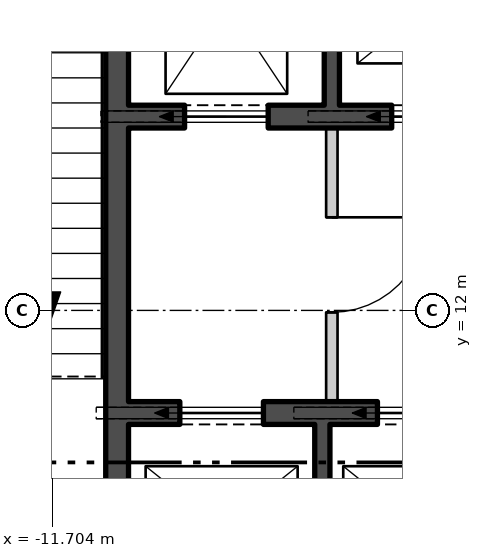
"""IFC4 building model, lengths in metres.
Left out: names, types, materials, properties, quantities, classifications, styles, units other than length and angle.
Written with IfcOpenShell. Run it as: python <this file> out.ifc"""

import sys

from ifc_helpers import new_model, si_unit, direction, frame, frame_2d, origin, place, context, subcontext, project, spatial, polyline, rectangle, outline, extrude, element, fill, save


model = new_model("IFC4")
c1 = context("Model", 3, precision=1e-05, world=origin(), true_north=direction((0.0, 1.0)))
c2 = subcontext(c1, "Body", "Model", "MODEL_VIEW")
j1 = project(units=[si_unit("LENGTHUNIT", "METRE"), si_unit("PLANEANGLEUNIT", "RADIAN")], contexts=[c1])
p1 = place(None, origin())
s1 = spatial("IfcSite", under=j1, at=p1, CompositionType="ELEMENT")
p2 = place(p1, origin())
s2 = spatial("IfcBuilding", under=s1, at=p2, CompositionType="ELEMENT")
p3 = place(p2, frame((0.0, 0.0, 111.3)))
s3 = spatial("IfcBuildingStorey", under=s2, at=p3, CompositionType="ELEMENT", Elevation=111.3)
p4 = place(p3, frame((-27.595, 11.782, -0.18), z_axis=(0.0, 0.0, 1.0), x_axis=(0.500000141277, -0.866025322218, 0.0)))
e1 = element("IfcWall", 1, at=p4, inside=s3, PredefinedType="SOLIDWALL", context=c2, shape_type="SweptSolid", body=[
    extrude(outline(polyline([(-0.13, -0.225), (45.86, -0.225), (45.6, 0.225), (0.13, 0.225), (-0.13, -0.225)])), origin(), (0.0, 0.0, 1.0), 4.28),
])
p5 = place(p4, frame((1.424, 0.0, 1.08)))
e2 = element("IfcOpeningElement", 2, at=p5, cuts=e1, PredefinedType="OPENING", context=c2, shape_type="SweptSolid", body=[
    extrude(rectangle(XDim=2.4, YDim=2.6, at=frame_2d((1.2, 1.3))), frame((0.0, 0.235, 0.0), z_axis=(0.0, -1.0, 0.0), x_axis=(1.0, 0.0, 0.0)), (0.0, 0.0, 1.0), 0.47),
])
p6 = place(p4, frame((5.892, 0.0, 1.08)))
e3 = element("IfcOpeningElement", 3, at=p6, cuts=e1, PredefinedType="OPENING", context=c2, shape_type="SweptSolid", body=[
    extrude(rectangle(XDim=2.4, YDim=2.6, at=frame_2d((1.2, 1.3))), frame((0.0, 0.235, 0.0), z_axis=(0.0, -1.0, 0.0), x_axis=(1.0, 0.0, 0.0)), (0.0, 0.0, 1.0), 0.47),
])
p7 = place(p4, frame((10.399, 0.0, 1.08)))
e4 = element("IfcOpeningElement", 4, at=p7, cuts=e1, PredefinedType="OPENING", context=c2, shape_type="SweptSolid", body=[
    extrude(rectangle(XDim=2.4, YDim=2.6, at=frame_2d((1.2, 1.3))), frame((0.0, 0.235, 0.0), z_axis=(0.0, -1.0, 0.0), x_axis=(1.0, 0.0, 0.0)), (0.0, 0.0, 1.0), 0.47),
])
p8 = place(p4, frame((14.905, 0.0, 1.08)))
e5 = element("IfcOpeningElement", 5, at=p8, cuts=e1, PredefinedType="OPENING", context=c2, shape_type="SweptSolid", body=[
    extrude(rectangle(XDim=2.4, YDim=2.6, at=frame_2d((1.2, 1.3))), frame((0.0, 0.235, 0.0), z_axis=(0.0, -1.0, 0.0), x_axis=(1.0, 0.0, 0.0)), (0.0, 0.0, 1.0), 0.47),
])
p9 = place(p4, frame((19.412, 0.0, 1.08)))
e6 = element("IfcOpeningElement", 6, at=p9, cuts=e1, PredefinedType="OPENING", context=c2, shape_type="SweptSolid", body=[
    extrude(rectangle(XDim=2.4, YDim=2.6, at=frame_2d((1.2, 1.3))), frame((0.0, 0.235, 0.0), z_axis=(0.0, -1.0, 0.0), x_axis=(1.0, 0.0, 0.0)), (0.0, 0.0, 1.0), 0.47),
])
p10 = place(p4, frame((23.918, 0.0, 1.08)))
e7 = element("IfcOpeningElement", 7, at=p10, cuts=e1, PredefinedType="OPENING", context=c2, shape_type="SweptSolid", body=[
    extrude(rectangle(XDim=2.4, YDim=2.6, at=frame_2d((1.2, 1.3))), frame((0.0, 0.235, 0.0), z_axis=(0.0, -1.0, 0.0), x_axis=(1.0, 0.0, 0.0)), (0.0, 0.0, 1.0), 0.47),
])
p11 = place(p4, frame((28.425, 0.0, 1.08)))
e8 = element("IfcOpeningElement", 8, at=p11, cuts=e1, PredefinedType="OPENING", context=c2, shape_type="SweptSolid", body=[
    extrude(rectangle(XDim=2.4, YDim=2.6, at=frame_2d((1.2, 1.3))), frame((0.0, 0.235, 0.0), z_axis=(0.0, -1.0, 0.0), x_axis=(1.0, 0.0, 0.0)), (0.0, 0.0, 1.0), 0.47),
])
p12 = place(p4, frame((32.932, 0.0, 1.08)))
e9 = element("IfcOpeningElement", 9, at=p12, cuts=e1, PredefinedType="OPENING", context=c2, shape_type="SweptSolid", body=[
    extrude(rectangle(XDim=2.4, YDim=2.6, at=frame_2d((1.2, 1.3))), frame((0.0, 0.235, 0.0), z_axis=(0.0, -1.0, 0.0), x_axis=(1.0, 0.0, 0.0)), (0.0, 0.0, 1.0), 0.47),
])
p13 = place(p4, frame((37.438, 0.0, 1.08)))
e10 = element("IfcOpeningElement", 10, at=p13, cuts=e1, PredefinedType="OPENING", context=c2, shape_type="SweptSolid", body=[
    extrude(rectangle(XDim=2.4, YDim=2.6, at=frame_2d((1.2, 1.3))), frame((0.0, 0.235, 0.0), z_axis=(0.0, -1.0, 0.0), x_axis=(1.0, 0.0, 0.0)), (0.0, 0.0, 1.0), 0.47),
])
p14 = place(p4, frame((41.907, 0.0, 1.08)))
e11 = element("IfcOpeningElement", 11, at=p14, cuts=e1, PredefinedType="OPENING", context=c2, shape_type="SweptSolid", body=[
    extrude(rectangle(XDim=2.4, YDim=2.6, at=frame_2d((1.2, 1.3))), frame((0.0, 0.235, 0.0), z_axis=(0.0, -1.0, 0.0), x_axis=(1.0, 0.0, 0.0)), (0.0, 0.0, 1.0), 0.47),
])
p15 = place(p3, frame((-10.85, 0.55, 0.0), z_axis=(0.0, 0.0, 1.0), x_axis=(0.0, 1.0, 0.0)))
e12 = element("IfcWall", 12, at=p15, inside=s3, PredefinedType="SHEAR", context=c2, shape_type="SweptSolid", body=[
    extrude(rectangle(XDim=16.9, YDim=0.3, at=frame_2d((8.45, 0.0))), origin(), (0.0, 0.0, 1.0), 4.3),
])
p16 = place(p15, frame((5.125, 0.0, 0.0)))
e13 = element("IfcOpeningElement", 13, at=p16, cuts=e12, PredefinedType="OPENING", context=c2, shape_type="SweptSolid", body=[
    extrude(rectangle(XDim=1.25, YDim=2.1, at=frame_2d((0.625, 1.05))), frame((0.0, 0.16, 0.0), z_axis=(0.0, -1.0, 0.0), x_axis=(1.0, 0.0, 0.0)), (0.0, 0.0, 1.0), 0.32),
])
p17 = place(p15, frame((1.55, 0.0, 0.0)))
e14 = element("IfcOpeningElement", 14, at=p17, cuts=e12, PredefinedType="OPENING", context=c2, shape_type="SweptSolid", body=[
    extrude(rectangle(XDim=1.0, YDim=2.1, at=frame_2d((0.5, 1.05))), frame((0.0, 0.16, 0.0), z_axis=(0.0, -1.0, 0.0), x_axis=(1.0, 0.0, 0.0)), (0.0, 0.0, 1.0), 0.32),
])
p18 = place(p3, frame((-10.7, 14.55, 0.0), z_axis=(0.0, 0.0, 1.0), x_axis=(1.0, 0.0, 0.0)))
e15 = element("IfcWall", 15, at=p18, inside=s3, PredefinedType="SHEAR", context=c2, shape_type="SweptSolid", body=[
    extrude(rectangle(XDim=21.4, YDim=0.3, at=frame_2d((10.7, 0.0))), origin(), (0.0, 0.0, 1.0), 4.3),
])
p19 = place(p18, frame((0.738, 0.0, 0.0)))
e16 = element("IfcOpeningElement", 16, at=p19, cuts=e15, PredefinedType="OPENING", context=c2, shape_type="SweptSolid", body=[
    extrude(rectangle(XDim=1.1, YDim=2.1, at=frame_2d((0.55, 1.05))), frame((0.0, 0.16, 0.0), z_axis=(0.0, -1.0, 0.0), x_axis=(1.0, 0.0, 0.0)), (0.0, 0.0, 1.0), 0.32),
])
p20 = place(p18, frame((3.462, 0.0, 0.0)))
e17 = element("IfcOpeningElement", 17, at=p20, cuts=e15, PredefinedType="OPENING", context=c2, shape_type="SweptSolid", body=[
    extrude(rectangle(XDim=1.1, YDim=2.1, at=frame_2d((0.55, 1.05))), frame((0.0, 0.16, 0.0), z_axis=(0.0, -1.0, 0.0), x_axis=(1.0, 0.0, 0.0)), (0.0, 0.0, 1.0), 0.32),
])
p21 = place(p18, frame((6.138, 0.0, 0.0)))
e18 = element("IfcOpeningElement", 18, at=p21, cuts=e15, PredefinedType="OPENING", context=c2, shape_type="SweptSolid", body=[
    extrude(rectangle(XDim=1.1, YDim=2.1, at=frame_2d((0.55, 1.05))), frame((0.0, 0.16, 0.0), z_axis=(0.0, -1.0, 0.0), x_axis=(1.0, 0.0, 0.0)), (0.0, 0.0, 1.0), 0.32),
])
p22 = place(p18, frame((8.812, 0.0, 0.0)))
e19 = element("IfcOpeningElement", 19, at=p22, cuts=e15, PredefinedType="OPENING", context=c2, shape_type="SweptSolid", body=[
    extrude(rectangle(XDim=1.1, YDim=2.1, at=frame_2d((0.55, 1.05))), frame((0.0, 0.16, 0.0), z_axis=(0.0, -1.0, 0.0), x_axis=(1.0, 0.0, 0.0)), (0.0, 0.0, 1.0), 0.32),
])
p23 = place(p18, frame((14.162, 0.0, 0.0)))
e20 = element("IfcOpeningElement", 20, at=p23, cuts=e15, PredefinedType="OPENING", context=c2, shape_type="SweptSolid", body=[
    extrude(rectangle(XDim=1.1, YDim=2.1, at=frame_2d((0.55, 1.05))), frame((0.0, 0.16, 0.0), z_axis=(0.0, -1.0, 0.0), x_axis=(1.0, 0.0, 0.0)), (0.0, 0.0, 1.0), 0.32),
])
p24 = place(p18, frame((16.837, 0.0, 0.0)))
e21 = element("IfcOpeningElement", 21, at=p24, cuts=e15, PredefinedType="OPENING", context=c2, shape_type="SweptSolid", body=[
    extrude(rectangle(XDim=1.1, YDim=2.1, at=frame_2d((0.55, 1.05))), frame((0.0, 0.16, 0.0), z_axis=(0.0, -1.0, 0.0), x_axis=(1.0, 0.0, 0.0)), (0.0, 0.0, 1.0), 0.32),
])
p25 = place(p18, frame((19.562, 0.0, 0.0)))
e22 = element("IfcOpeningElement", 22, at=p25, cuts=e15, PredefinedType="OPENING", context=c2, shape_type="SweptSolid", body=[
    extrude(rectangle(XDim=1.1, YDim=2.1, at=frame_2d((0.55, 1.05))), frame((0.0, 0.16, 0.0), z_axis=(0.0, -1.0, 0.0), x_axis=(1.0, 0.0, 0.0)), (0.0, 0.0, 1.0), 0.32),
])
p26 = place(p3, frame((-10.7, 10.65, 0.0), z_axis=(0.0, 0.0, 1.0), x_axis=(1.0, 0.0, 0.0)))
e23 = element("IfcWall", 23, at=p26, inside=s3, PredefinedType="SHEAR", context=c2, shape_type="SweptSolid", body=[
    extrude(rectangle(XDim=10.3, YDim=0.3, at=frame_2d((5.15, 0.0))), origin(), (0.0, 0.0, 1.0), 4.3),
])
p27 = place(p26, frame((0.675, 0.0, 0.0)))
e24 = element("IfcOpeningElement", 24, at=p27, cuts=e23, PredefinedType="OPENING", context=c2, shape_type="SweptSolid", body=[
    extrude(rectangle(XDim=1.1, YDim=2.1, at=frame_2d((0.55, 1.05))), frame((0.0, 0.16, 0.0), z_axis=(0.0, -1.0, 0.0), x_axis=(1.0, 0.0, 0.0)), (0.0, 0.0, 1.0), 0.32),
])
p28 = place(p26, frame((3.275, 0.0, 0.0)))
e25 = element("IfcOpeningElement", 25, at=p28, cuts=e23, PredefinedType="OPENING", context=c2, shape_type="SweptSolid", body=[
    extrude(rectangle(XDim=1.1, YDim=2.1, at=frame_2d((0.55, 1.05))), frame((0.0, 0.16, 0.0), z_axis=(0.0, -1.0, 0.0), x_axis=(1.0, 0.0, 0.0)), (0.0, 0.0, 1.0), 0.32),
])
p29 = place(p26, frame((5.825, 0.0, 0.0)))
e26 = element("IfcOpeningElement", 26, at=p29, cuts=e23, PredefinedType="OPENING", context=c2, shape_type="SweptSolid", body=[
    extrude(rectangle(XDim=1.1, YDim=2.1, at=frame_2d((0.55, 1.05))), frame((0.0, 0.16, 0.0), z_axis=(0.0, -1.0, 0.0), x_axis=(1.0, 0.0, 0.0)), (0.0, 0.0, 1.0), 0.32),
])
p30 = place(p26, frame((8.375, 0.0, 0.0)))
e27 = element("IfcOpeningElement", 27, at=p30, cuts=e23, PredefinedType="OPENING", context=c2, shape_type="SweptSolid", body=[
    extrude(rectangle(XDim=1.1, YDim=2.1, at=frame_2d((0.55, 1.05))), frame((0.0, 0.16, 0.0), z_axis=(0.0, -1.0, 0.0), x_axis=(1.0, 0.0, 0.0)), (0.0, 0.0, 1.0), 0.32),
])
p31 = place(p3, frame((-8.025, 14.7, 0.0), z_axis=(0.0, 0.0, 1.0), x_axis=(0.0, 1.0, 0.0)))
e28 = element("IfcWall", 28, at=p31, inside=s3, PredefinedType="SHEAR", context=c2, shape_type="SweptSolid", body=[
    extrude(rectangle(XDim=2.75, YDim=0.2, at=frame_2d((1.375, 0.0))), origin(), (0.0, 0.0, 1.0), 4.3),
])
p32 = place(p3, frame((-8.15, 7.8, 0.0), z_axis=(0.0, 0.0, 1.0), x_axis=(0.0, 1.0, 0.0)))
e29 = element("IfcWall", 29, at=p32, inside=s3, PredefinedType="SHEAR", context=c2, shape_type="SweptSolid", body=[
    extrude(rectangle(XDim=2.7, YDim=0.2, at=frame_2d((1.35, 0.0))), origin(), (0.0, 0.0, 1.0), 4.3),
])
p33 = place(p3, frame((-8.025, 10.8, 0.0), z_axis=(0.0, 0.0, 1.0), x_axis=(0.0, 1.0, 0.0)))
e30 = element("IfcWall", 30, at=p33, inside=s3, PredefinedType="PARTITIONING", context=c2, shape_type="SweptSolid", body=[
    extrude(rectangle(XDim=3.6, YDim=0.15, at=frame_2d((1.8, 0.0))), origin(), (0.0, 0.0, 1.0), 4.3),
])
p34 = place(p33, frame((1.175, 0.0, 0.0)))
e31 = element("IfcOpeningElement", 31, at=p34, cuts=e30, PredefinedType="OPENING", context=c2, shape_type="SweptSolid", body=[
    extrude(rectangle(XDim=1.25, YDim=2.1, at=frame_2d((0.625, 1.05))), frame((0.0, 0.085, 0.0), z_axis=(0.0, -1.0, 0.0), x_axis=(1.0, 0.0, 0.0)), (0.0, 0.0, 1.0), 0.17),
])
p35 = place(p19, origin())
e32 = element("IfcDoor", 32, at=p35, inside=s3, OperationType="SLIDING_TO_LEFT", PredefinedType="DOOR", context=c2, shape_type="SweptSolid", body=[
    extrude(rectangle(XDim=1.1, YDim=2.1, at=frame_2d((0.55, 1.05))), frame((0.0, 0.025, 0.0), z_axis=(0.0, -1.0, 0.0), x_axis=(1.0, 0.0, 0.0)), (0.0, 0.0, 1.0), 0.05),
])
fill(e16, e32)
p36 = place(p20, origin())
e33 = element("IfcDoor", 33, at=p36, inside=s3, OperationType="SLIDING_TO_LEFT", PredefinedType="DOOR", context=c2, shape_type="SweptSolid", body=[
    extrude(rectangle(XDim=1.1, YDim=2.1, at=frame_2d((0.55, 1.05))), frame((0.0, 0.025, 0.0), z_axis=(0.0, -1.0, 0.0), x_axis=(1.0, 0.0, 0.0)), (0.0, 0.0, 1.0), 0.05),
])
fill(e17, e33)
p37 = place(p27, origin())
e34 = element("IfcDoor", 34, at=p37, inside=s3, OperationType="SLIDING_TO_LEFT", PredefinedType="DOOR", context=c2, shape_type="SweptSolid", body=[
    extrude(rectangle(XDim=1.1, YDim=2.1, at=frame_2d((0.55, 1.05))), frame((0.0, 0.025, 0.0), z_axis=(0.0, -1.0, 0.0), x_axis=(1.0, 0.0, 0.0)), (0.0, 0.0, 1.0), 0.05),
])
fill(e24, e34)
p38 = place(p28, origin())
e35 = element("IfcDoor", 35, at=p38, inside=s3, OperationType="SLIDING_TO_LEFT", PredefinedType="DOOR", context=c2, shape_type="SweptSolid", body=[
    extrude(rectangle(XDim=1.1, YDim=2.1, at=frame_2d((0.55, 1.05))), frame((0.0, 0.025, 0.0), z_axis=(0.0, -1.0, 0.0), x_axis=(1.0, 0.0, 0.0)), (0.0, 0.0, 1.0), 0.05),
])
fill(e25, e35)
p39 = place(p34, origin())
e36 = element("IfcDoor", 36, at=p39, inside=s3, OperationType="SINGLE_SWING_RIGHT", PredefinedType="DOOR", context=c2, shape_type="SweptSolid", body=[
    extrude(rectangle(XDim=1.25, YDim=2.1, at=frame_2d((0.625, 1.05))), frame((0.0, 0.025, 0.0), z_axis=(0.0, -1.0, 0.0), x_axis=(1.0, 0.0, 0.0)), (0.0, 0.0, 1.0), 0.05),
])
fill(e31, e36)
save(model, sys.argv[1])
